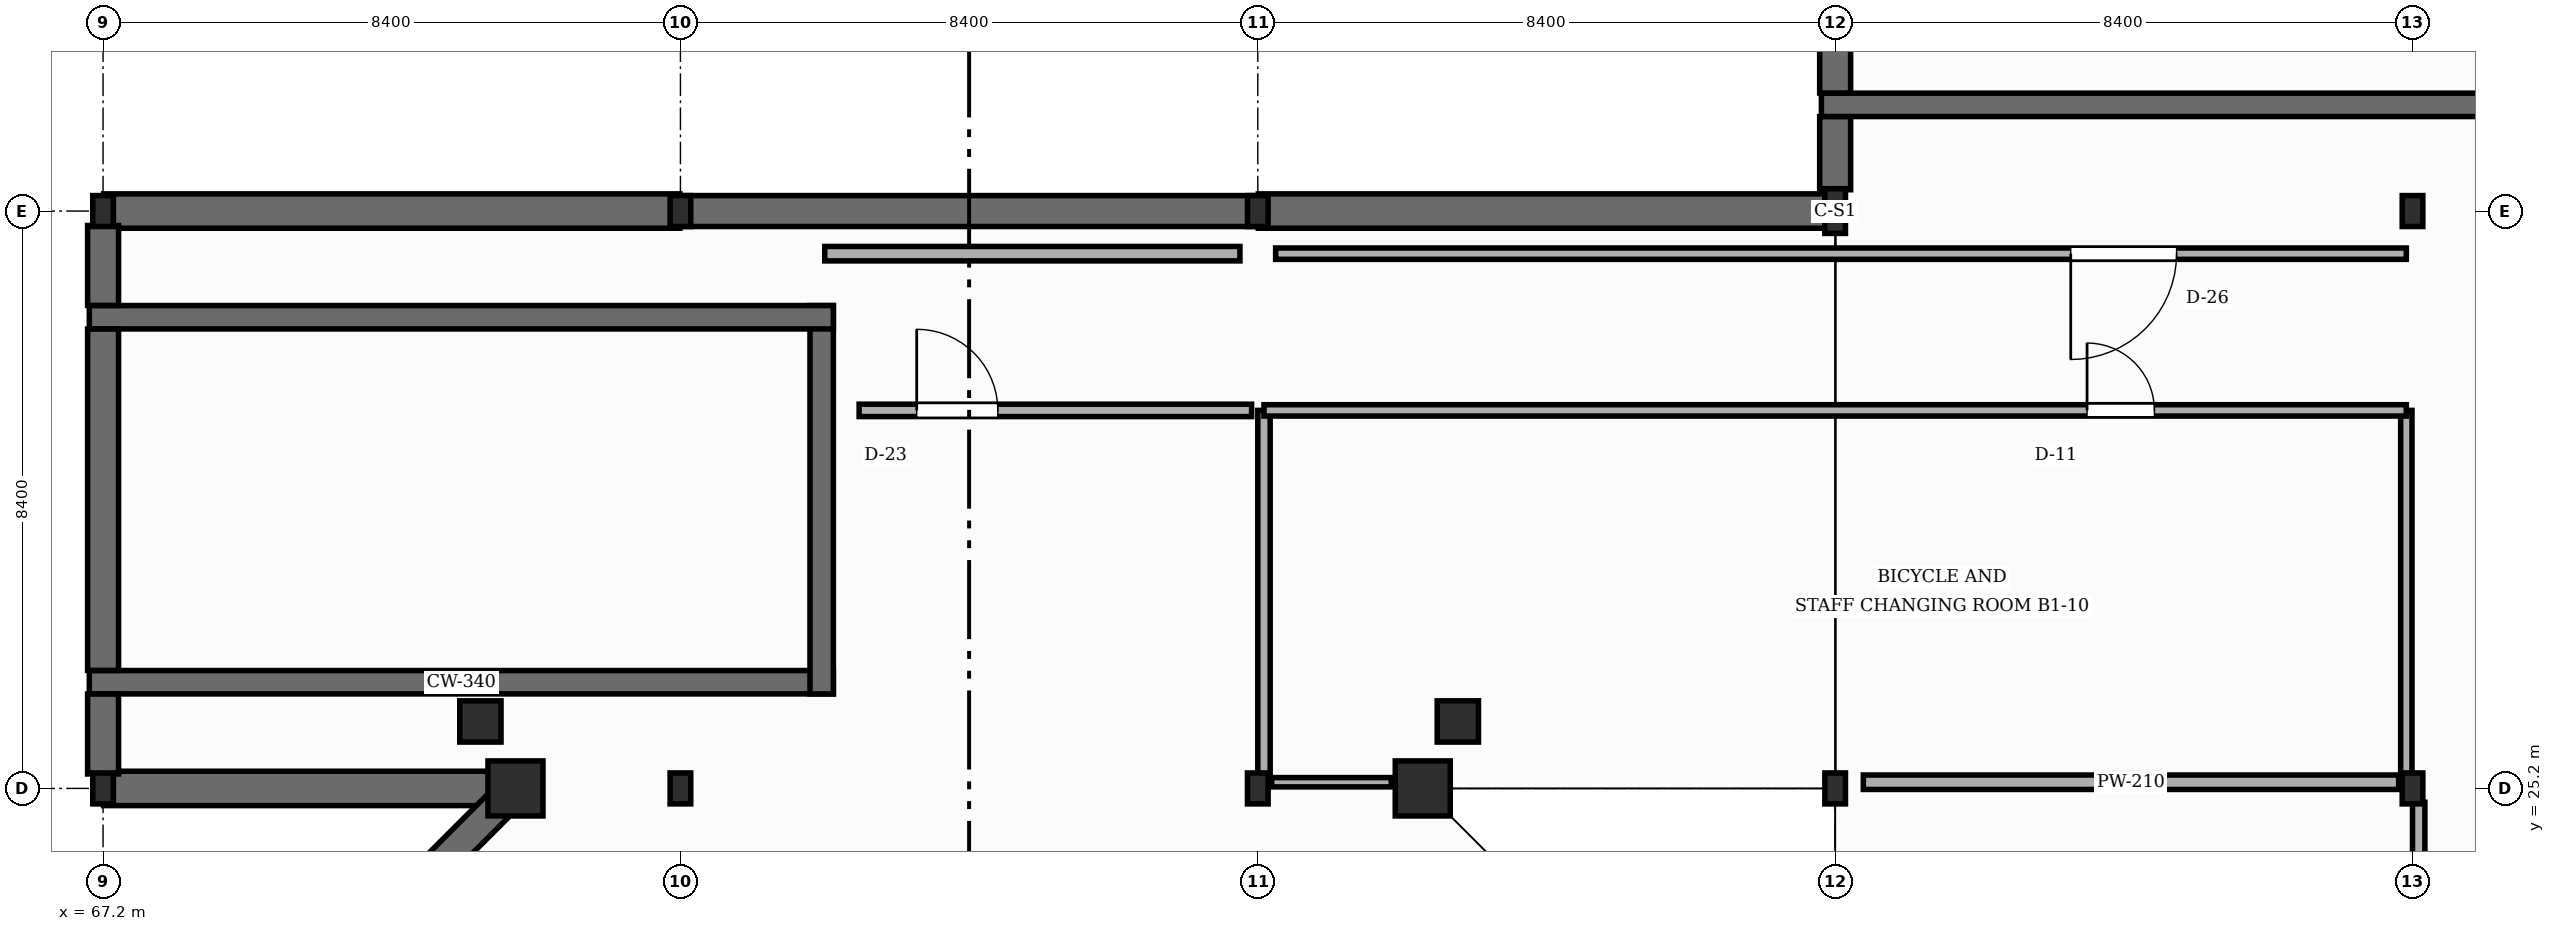
"""IFC4 building model, lengths in metres.
Left out: names, types, materials, properties, quantities, classifications, styles, units other than length and angle.
Written with IfcOpenShell. Run it as: python <this file> out.ifc"""

import sys

from ifc_helpers import new_model, si_unit, direction, frame, frame_2d, origin, origin_2d, place, context, subcontext, project, spatial, rectangle, i_section, extrude, element, fill, save


model = new_model("IFC4")
c1 = context("Model", 3, precision=1e-05, world=origin(), true_north=direction((0.0, 1.0)))
c2 = subcontext(c1, "Body", "Model", "MODEL_VIEW")
j1 = project(units=[si_unit("LENGTHUNIT", "METRE"), si_unit("PLANEANGLEUNIT", "RADIAN")], contexts=[c1])
p1 = place(None, origin())
s1 = spatial("IfcSite", under=j1, at=p1, CompositionType="ELEMENT")
p2 = place(p1, origin())
s2 = spatial("IfcBuilding", under=s1, at=p2, CompositionType="ELEMENT")
p3 = place(p2, frame((0.0, 0.0, -4.5)))
s3 = spatial("IfcBuildingStorey", under=s2, at=p3, CompositionType="ELEMENT", Elevation=-4.5)
for number, where, z_axis, x_axis in (
    (1, (67.2, 25.2, 0.0), (0.0, 0.0, 1.0), (1.0, 0.0, 0.0)),
    (2, (67.2, 33.6, 0.0), (0.0, 0.0, 1.0), (1.0, 0.0, 0.0)),
    (3, (75.6, 25.2, 0.0), (0.0, 0.0, 1.0), (1.0, 0.0, 0.0)),
    (4, (75.6, 33.6, 0.0), (0.0, 0.0, 1.0), (1.0, 0.0, 0.0)),
    (5, (84.0, 25.2, 0.0), (0.0, 0.0, 1.0), (1.0, 0.0, 0.0)),
    (6, (84.0, 33.6, 0.0), (0.0, 0.0, 1.0), (1.0, 0.0, 0.0)),
    (7, (92.4, 25.2, 0.0), (0.0, 0.0, 1.0), (1.0, 0.0, 0.0)),
):
    element("IfcColumn", number, at=place(p3, frame(where, z_axis=z_axis, x_axis=x_axis)), inside=s3, PredefinedType="COLUMN", context=c2, shape_type="SweptSolid", body=[
        extrude(i_section(OverallWidth=0.3, OverallDepth=0.45, WebThickness=0.014, FlangeThickness=0.026, FilletRadius=0.027, at=origin_2d()), origin(), (0.0, 0.0, 1.0), 4.5),
    ])
p4 = place(p3, frame((92.4, 33.6, 0.0), z_axis=(0.0, 0.0, 1.0), x_axis=(1.0, 0.0, 0.0)))
e8 = element("IfcColumn", 8, at=p4, inside=s3, PredefinedType="COLUMN", context=c2, shape_type="SweptSolid", body=[
    extrude(i_section(OverallWidth=0.3, OverallDepth=0.65, WebThickness=0.016, FlangeThickness=0.031, FilletRadius=0.027, at=origin_2d()), origin(), (0.0, 0.0, 1.0), 4.5),
])
for number, where, z_axis, x_axis in (
    (9, (100.8, 25.2, 0.0), (0.0, 0.0, 1.0), (1.0, 0.0, 0.0)),
    (10, (100.8, 33.6, 0.0), (0.0, 0.0, 1.0), (1.0, 0.0, 0.0)),
):
    element("IfcColumn", number, at=place(p3, frame(where, z_axis=z_axis, x_axis=x_axis)), inside=s3, PredefinedType="COLUMN", context=c2, shape_type="SweptSolid", body=[
        extrude(i_section(OverallWidth=0.3, OverallDepth=0.45, WebThickness=0.014, FlangeThickness=0.026, FilletRadius=0.027, at=origin_2d()), origin(), (0.0, 0.0, 1.0), 4.5),
    ])
p5 = place(p3, frame((86.4, 25.2, 0.0), z_axis=(0.0, 0.0, 1.0), x_axis=(1.0, 0.0, 0.0)))
e11 = element("IfcColumn", 11, at=p5, inside=s3, PredefinedType="COLUMN", context=c2, shape_type="SweptSolid", body=[
    extrude(rectangle(XDim=0.8, YDim=0.8, at=origin_2d()), origin(), (0.0, 0.0, 1.0), 4.5),
])
p6 = place(p3, frame((86.91, 26.174, 0.0), z_axis=(0.0, 0.0, 1.0), x_axis=(1.0, 0.0, 0.0)))
e12 = element("IfcColumn", 12, at=p6, inside=s3, PredefinedType="COLUMN", context=c2, shape_type="SweptSolid", body=[
    extrude(rectangle(XDim=0.6, YDim=0.6, at=origin_2d()), origin(), (0.0, 0.0, 1.0), 4.5),
])
p7 = place(p3, frame((73.2, 25.2, 0.0), z_axis=(0.0, 0.0, 1.0), x_axis=(1.0, 0.0, 0.0)))
e13 = element("IfcColumn", 13, at=p7, inside=s3, PredefinedType="COLUMN", context=c2, shape_type="SweptSolid", body=[
    extrude(rectangle(XDim=0.8, YDim=0.8, at=origin_2d()), origin(), (0.0, 0.0, 1.0), 4.5),
])
p8 = place(p3, frame((72.69, 26.174, 0.0), z_axis=(0.0, 0.0, 1.0), x_axis=(1.0, 0.0, 0.0)))
e14 = element("IfcColumn", 14, at=p8, inside=s3, PredefinedType="COLUMN", context=c2, shape_type="SweptSolid", body=[
    extrude(rectangle(XDim=0.6, YDim=0.6, at=origin_2d()), origin(), (0.0, 0.0, 1.0), 4.5),
])
p9 = place(p3, frame((92.392, 33.6, 0.0), z_axis=(0.0, 0.0, 1.0), x_axis=(-1.0, 0.0, 0.0)))
e15 = element("IfcWall", 15, at=p9, inside=s3, PredefinedType="USERDEFINED", context=c2, shape_type="SweptSolid", body=[
    extrude(rectangle(XDim=8.384, YDim=0.5, at=frame_2d((4.192, 0.0))), origin(), (0.0, 0.0, 1.0), 4.25),
])
p10 = place(p3, frame((83.992, 33.6, 0.0), z_axis=(0.0, 0.0, 1.0), x_axis=(-1.0, 0.0, 0.0)))
e16 = element("IfcWall", 16, at=p10, inside=s3, PredefinedType="USERDEFINED", context=c2, shape_type="SweptSolid", body=[
    extrude(rectangle(XDim=8.384, YDim=0.45, at=frame_2d((4.192, 0.0))), origin(), (0.0, 0.0, 1.0), 4.25),
])
p11 = place(p3, frame((75.592, 33.6, 0.0), z_axis=(0.0, 0.0, 1.0), x_axis=(-1.0, 0.0, 0.0)))
e17 = element("IfcWall", 17, at=p11, inside=s3, PredefinedType="USERDEFINED", context=c2, shape_type="SweptSolid", body=[
    extrude(rectangle(XDim=8.384, YDim=0.5, at=frame_2d((4.192, 0.0))), origin(), (0.0, 0.0, 1.0), 4.25),
])
p12 = place(p3, frame((67.208, 25.2, 0.0), z_axis=(0.0, 0.0, 1.0), x_axis=(1.0, 0.0, 0.0)))
e18 = element("IfcWall", 18, at=p12, inside=s3, PredefinedType="USERDEFINED", context=c2, shape_type="SweptSolid", body=[
    extrude(rectangle(XDim=5.607, YDim=0.5, at=frame_2d((2.803, 0.0))), origin(), (0.0, 0.0, 1.0), 4.25),
])
p13 = place(p3, frame((72.95, 24.95, 0.0), z_axis=(0.0, 0.0, 1.0), x_axis=(-0.707106781187, -0.707106781187, 0.0)))
e19 = element("IfcWall", 19, at=p13, inside=s3, PredefinedType="USERDEFINED", context=c2, shape_type="SweptSolid", body=[
    extrude(rectangle(XDim=7.779, YDim=0.45, at=frame_2d((3.89, 0.0))), origin(), (0.0, 0.0, 1.0), 4.25),
])
p14 = place(p3, frame((67.0, 26.745, 0.0), z_axis=(0.0, 0.0, 1.0), x_axis=(1.0, 0.0, 0.0)))
e20 = element("IfcWall", 20, at=p14, inside=s3, PredefinedType="SHEAR", context=c2, shape_type="SweptSolid", body=[
    extrude(rectangle(XDim=10.825, YDim=0.34, at=frame_2d((5.413, 0.0))), origin(), (0.0, 0.0, 1.0), 4.25),
])
p15 = place(p3, frame((77.655, 26.575, 0.0), z_axis=(0.0, 0.0, 1.0), x_axis=(0.0, 1.0, 0.0)))
e21 = element("IfcWall", 21, at=p15, inside=s3, PredefinedType="SHEAR", context=c2, shape_type="SweptSolid", body=[
    extrude(rectangle(XDim=5.65, YDim=0.34, at=frame_2d((2.825, 0.0))), origin(), (0.0, 0.0, 1.0), 4.25),
])
p16 = place(p3, frame((67.0, 32.055, 0.0), z_axis=(0.0, 0.0, 1.0), x_axis=(1.0, 0.0, 0.0)))
e22 = element("IfcWall", 22, at=p16, inside=s3, PredefinedType="SHEAR", context=c2, shape_type="SweptSolid", body=[
    extrude(rectangle(XDim=10.825, YDim=0.34, at=frame_2d((5.413, 0.0))), origin(), (0.0, 0.0, 1.0), 4.25),
])
p17 = place(p3, frame((92.2, 35.145, 0.0), z_axis=(0.0, 0.0, 1.0), x_axis=(1.0, 0.0, 0.0)))
e23 = element("IfcWall", 23, at=p17, inside=s3, PredefinedType="SHEAR", context=c2, shape_type="SweptSolid", body=[
    extrude(rectangle(XDim=11.295, YDim=0.34, at=frame_2d((5.647, 0.0))), origin(), (0.0, 0.0, 1.0), 4.25),
])
p18 = place(p3, frame((100.89, 17.22, -0.004), z_axis=(0.0, 0.0, 1.0), x_axis=(0.0, 1.0, 0.0)))
e24 = element("IfcWall", 24, at=p18, inside=s3, PredefinedType="STANDARD", context=c2, shape_type="SweptSolid", body=[
    extrude(rectangle(XDim=7.778, YDim=0.18, at=frame_2d((3.889, 0.0))), origin(), (0.0, 0.0, 1.0), 3.636),
])
p19 = place(p3, frame((100.71, 30.7, -0.004), z_axis=(0.0, 0.0, 1.0), x_axis=(0.0, -1.0, 0.0)))
e25 = element("IfcWall", 25, at=p19, inside=s3, PredefinedType="STANDARD", context=c2, shape_type="SweptSolid", body=[
    extrude(rectangle(XDim=5.298, YDim=0.165, at=frame_2d((2.649, 0.0))), origin(), (0.0, 0.0, 1.0), 3.746),
])
p20 = place(p3, frame((100.598, 25.29, -0.004), z_axis=(0.0, 0.0, 1.0), x_axis=(-1.0, 0.0, 0.0)))
e26 = element("IfcWall", 26, at=p20, inside=s3, PredefinedType="STANDARD", context=c2, shape_type="SweptSolid", body=[
    extrude(rectangle(XDim=7.789, YDim=0.21, at=frame_2d((3.894, 0.0))), origin(), (0.0, 0.0, 1.0), 3.686),
])
p21 = place(p3, frame((85.942, 25.29, -0.004), z_axis=(0.0, 0.0, 1.0), x_axis=(-1.0, 0.0, 0.0)))
e27 = element("IfcWall", 27, at=p21, inside=s3, PredefinedType="STANDARD", context=c2, shape_type="SweptSolid", body=[
    extrude(rectangle(XDim=1.741, YDim=0.135, at=frame_2d((0.87, 0.0))), origin(), (0.0, 0.0, 1.0), 3.846),
])
p22 = place(p3, frame((84.09, 25.402, -0.004), z_axis=(0.0, 0.0, 1.0), x_axis=(0.0, 1.0, 0.0)))
e28 = element("IfcWall", 28, at=p22, inside=s3, PredefinedType="STANDARD", context=c2, shape_type="SweptSolid", body=[
    extrude(rectangle(XDim=5.298, YDim=0.18, at=frame_2d((2.649, 0.0))), origin(), (0.0, 0.0, 1.0), 3.926),
])
p23 = place(p3, frame((84.09, 30.7, -0.004), z_axis=(0.0, 0.0, 1.0), x_axis=(1.0, 0.0, 0.0)))
e29 = element("IfcWall", 29, at=p23, inside=s3, PredefinedType="STANDARD", context=c2, shape_type="SweptSolid", body=[
    extrude(rectangle(XDim=16.62, YDim=0.165, at=frame_2d((8.31, 0.0))), origin(), (0.0, 0.0, 1.0), 4.254),
])
p24 = place(p23, frame((11.975, 0.0, 0.015)))
e30 = element("IfcOpeningElement", 30, at=p24, cuts=e29, PredefinedType="OPENING", context=c2, shape_type="SweptSolid", body=[
    extrude(rectangle(XDim=0.98, YDim=2.14, at=frame_2d((0.49, 1.07))), frame((0.0, 0.093, 0.0), z_axis=(0.0, -1.0, 0.0), x_axis=(1.0, 0.0, 0.0)), (0.0, 0.0, 1.0), 0.185),
])
p25 = place(p3, frame((78.2, 30.7, -0.004), z_axis=(0.0, 0.0, 1.0), x_axis=(1.0, 0.0, 0.0)))
e31 = element("IfcWall", 31, at=p25, inside=s3, PredefinedType="STANDARD", context=c2, shape_type="SweptSolid", body=[
    extrude(rectangle(XDim=5.71, YDim=0.18, at=frame_2d((2.855, 0.0))), origin(), (0.0, 0.0, 1.0), 4.254),
])
p26 = place(p25, frame((0.837, 0.0, 0.015)))
e32 = element("IfcOpeningElement", 32, at=p26, cuts=e31, PredefinedType="OPENING", context=c2, shape_type="SweptSolid", body=[
    extrude(rectangle(XDim=1.18, YDim=2.22, at=frame_2d((0.59, 1.11))), frame((0.0, 0.1, 0.0), z_axis=(0.0, -1.0, 0.0), x_axis=(1.0, 0.0, 0.0)), (0.0, 0.0, 1.0), 0.2),
])
p27 = place(p3, frame((100.71, 32.98, -0.004), z_axis=(0.0, 0.0, 1.0), x_axis=(-1.0, 0.0, 0.0)))
e33 = element("IfcWall", 33, at=p27, inside=s3, PredefinedType="STANDARD", context=c2, shape_type="SweptSolid", body=[
    extrude(rectangle(XDim=16.45, YDim=0.165, at=frame_2d((8.225, 0.0))), origin(), (0.0, 0.0, 1.0), 4.254),
])
p28 = place(p27, frame((3.343, 0.0, 0.015)))
e34 = element("IfcOpeningElement", 34, at=p28, cuts=e33, PredefinedType="OPENING", context=c2, shape_type="SweptSolid", body=[
    extrude(rectangle(XDim=1.54, YDim=2.22, at=frame_2d((0.77, 1.11))), frame((0.0, 0.093, 0.0), z_axis=(0.0, -1.0, 0.0), x_axis=(1.0, 0.0, 0.0)), (0.0, 0.0, 1.0), 0.185),
])
p29 = place(p3, frame((83.74, 32.98, -0.004), z_axis=(0.0, 0.0, 1.0), x_axis=(-1.0, 0.0, 0.0)))
e35 = element("IfcWall", 35, at=p29, inside=s3, PredefinedType="STANDARD", context=c2, shape_type="SweptSolid", body=[
    extrude(rectangle(XDim=6.04, YDim=0.21, at=frame_2d((3.02, 0.0))), origin(), (0.0, 0.0, 1.0), 4.254),
])
p30 = place(p3, frame((92.4, 40.283, 0.0), z_axis=(0.0, 0.0, 1.0), x_axis=(0.0, -1.0, 0.0)))
e36 = element("IfcWall", 36, at=p30, inside=s3, PredefinedType="USERDEFINED", context=c2, shape_type="SweptSolid", body=[
    extrude(rectangle(XDim=4.966, YDim=0.45, at=frame_2d((2.483, 0.0))), origin(), (0.0, 0.0, 1.0), 4.25),
])
p31 = place(p3, frame((92.4, 34.973, 0.0), z_axis=(0.0, 0.0, 1.0), x_axis=(0.0, -1.0, 0.0)))
e37 = element("IfcWall", 37, at=p31, inside=s3, PredefinedType="USERDEFINED", context=c2, shape_type="SweptSolid", body=[
    extrude(rectangle(XDim=1.063, YDim=0.45, at=frame_2d((0.531, 0.0))), origin(), (0.0, 0.0, 1.0), 4.25),
])
p32 = place(p3, frame((67.2, 33.39, 0.0), z_axis=(0.0, 0.0, 1.0), x_axis=(0.0, -1.0, 0.0)))
e38 = element("IfcWall", 38, at=p32, inside=s3, PredefinedType="USERDEFINED", context=c2, shape_type="SweptSolid", body=[
    extrude(rectangle(XDim=1.163, YDim=0.45, at=frame_2d((0.582, 0.0))), origin(), (0.0, 0.0, 1.0), 4.25),
])
p33 = place(p3, frame((67.2, 31.883, 0.0), z_axis=(0.0, 0.0, 1.0), x_axis=(0.0, -1.0, 0.0)))
e39 = element("IfcWall", 39, at=p33, inside=s3, PredefinedType="USERDEFINED", context=c2, shape_type="SweptSolid", body=[
    extrude(rectangle(XDim=4.966, YDim=0.45, at=frame_2d((2.483, 0.0))), origin(), (0.0, 0.0, 1.0), 4.25),
])
p34 = place(p3, frame((67.2, 26.573, 0.0), z_axis=(0.0, 0.0, 1.0), x_axis=(0.0, -1.0, 0.0)))
e40 = element("IfcWall", 40, at=p34, inside=s3, PredefinedType="USERDEFINED", context=c2, shape_type="SweptSolid", body=[
    extrude(rectangle(XDim=1.163, YDim=0.45, at=frame_2d((0.582, 0.0))), origin(), (0.0, 0.0, 1.0), 4.25),
])
p35 = place(p24, origin())
e41 = element("IfcDoor", 41, at=p35, inside=s3, OperationType="SINGLE_SWING_LEFT", PredefinedType="DOOR", context=c2, shape_type="SweptSolid", body=[
    extrude(rectangle(XDim=0.98, YDim=2.14, at=frame_2d((0.49, 1.07))), frame((0.0, 0.025, 0.0), z_axis=(0.0, -1.0, 0.0), x_axis=(1.0, 0.0, 0.0)), (0.0, 0.0, 1.0), 0.05),
])
fill(e30, e41)
p36 = place(p26, origin())
e42 = element("IfcDoor", 42, at=p36, inside=s3, OperationType="SINGLE_SWING_LEFT", PredefinedType="DOOR", context=c2, shape_type="SweptSolid", body=[
    extrude(rectangle(XDim=1.18, YDim=2.22, at=frame_2d((0.59, 1.11))), frame((0.0, 0.025, 0.0), z_axis=(0.0, -1.0, 0.0), x_axis=(1.0, 0.0, 0.0)), (0.0, 0.0, 1.0), 0.05),
])
fill(e32, e42)
p37 = place(p28, origin())
e43 = element("IfcDoor", 43, at=p37, inside=s3, OperationType="SINGLE_SWING_RIGHT", PredefinedType="DOOR", context=c2, shape_type="SweptSolid", body=[
    extrude(rectangle(XDim=1.54, YDim=2.22, at=frame_2d((0.77, 1.11))), frame((0.0, 0.025, 0.0), z_axis=(0.0, -1.0, 0.0), x_axis=(1.0, 0.0, 0.0)), (0.0, 0.0, 1.0), 0.05),
])
fill(e34, e43)
save(model, sys.argv[1])
